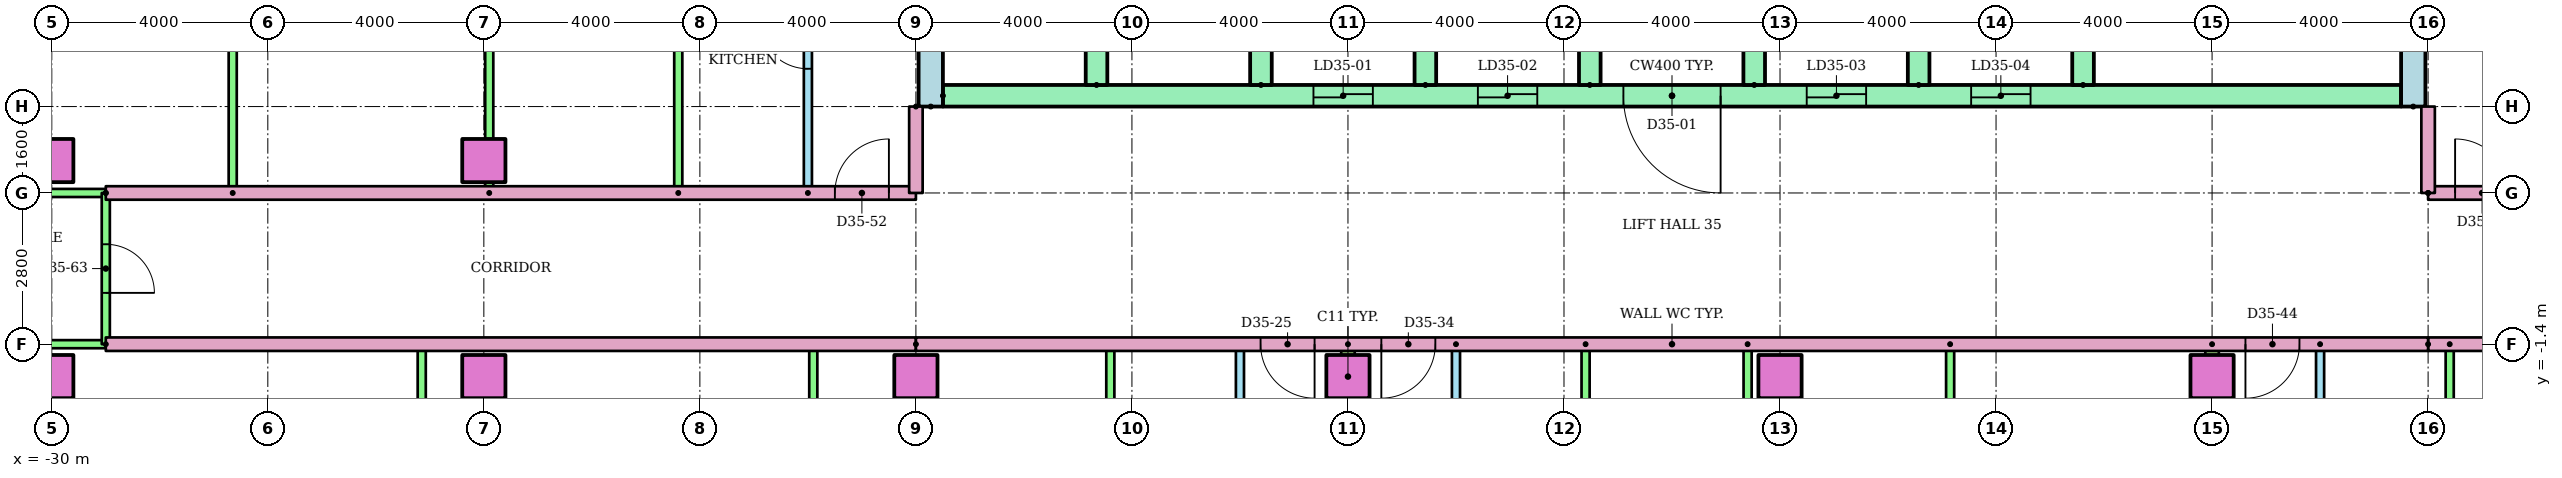
"""IFC4 building model, lengths in metres.
Left out: names, types, materials, properties, quantities, classifications, styles, units other than length and angle.
Written with IfcOpenShell. Run it as: python <this file> out.ifc"""

import sys

from ifc_helpers import new_model, si_unit, direction, frame, frame_2d, origin, origin_2d, place, context, subcontext, project, spatial, rectangle, extrude, element, fill, save


model = new_model("IFC4")
c1 = context("Model", 3, precision=1e-05, world=origin(), true_north=direction((0.0, 1.0)))
c2 = subcontext(c1, "Body", "Model", "MODEL_VIEW")
j1 = project(units=[si_unit("LENGTHUNIT", "METRE"), si_unit("PLANEANGLEUNIT", "RADIAN")], contexts=[c1])
p1 = place(None, origin())
s1 = spatial("IfcSite", under=j1, at=p1, CompositionType="ELEMENT")
p2 = place(p1, origin())
s2 = spatial("IfcBuilding", under=s1, at=p2, CompositionType="ELEMENT")
p3 = place(p2, frame((0.0, 0.0, 135.8)))
s3 = spatial("IfcBuildingStorey", under=s2, at=p3, CompositionType="ELEMENT", Elevation=135.8)
for number, where in (
    (1, (-30.0, -2.0, 0.0)),
    (2, (-22.0, -2.0, 0.0)),
    (3, (-14.0, -2.0, 0.0)),
    (4, (-6.0, -2.0, 0.0)),
    (5, (2.0, -2.0, 0.0)),
    (6, (10.0, -2.0, 0.0)),
    (7, (-30.0, 2.0, 0.0)),
    (8, (-22.0, 2.0, 0.0)),
):
    element("IfcColumn", number, at=place(p3, frame(where)), inside=s3, PredefinedType="COLUMN", context=c2, shape_type="SweptSolid", body=[
        extrude(rectangle(XDim=0.8, YDim=0.8, at=origin_2d()), origin(), (0.0, 0.0, 1.0), 3.2),
    ])
for number, where, z_axis, x_axis in (
    (9, (-13.725, 3.0, 0.0), (0.0, 0.0, 1.0), (0.0, 1.0, 0.0)),
    (10, (13.725, 3.0, 0.0), (0.0, 0.0, 1.0), (0.0, 1.0, 0.0)),
):
    element("IfcWall", number, at=place(p3, frame(where, z_axis=z_axis, x_axis=x_axis)), inside=s3, PredefinedType="SHEAR", context=c2, shape_type="SweptSolid", body=[
        extrude(rectangle(XDim=17.0, YDim=0.45, at=frame_2d((8.5, 0.0))), origin(), (0.0, 0.0, 1.0), 2.92),
    ])
p4 = place(p3, frame((-13.5, 3.2, 0.0)))
e11 = element("IfcWall", 11, at=p4, inside=s3, PredefinedType="SHEAR", context=c2, shape_type="SweptSolid", body=[
    extrude(rectangle(XDim=27.0, YDim=0.4, at=frame_2d((13.5, 0.0))), origin(), (0.0, 0.0, 1.0), 2.92),
])
p5 = place(p4, frame((6.861, 0.0, 0.0)))
e12 = element("IfcOpeningElement", 12, at=p5, cuts=e11, PredefinedType="OPENING", context=c2, shape_type="SweptSolid", body=[
    extrude(rectangle(XDim=1.1, YDim=2.1, at=frame_2d((0.55, 1.05))), frame((0.0, 0.21, 0.0), z_axis=(0.0, -1.0, 0.0), x_axis=(1.0, 0.0, 0.0)), (0.0, 0.0, 1.0), 0.42),
])
p6 = place(p4, frame((9.906, 0.0, 0.0)))
e13 = element("IfcOpeningElement", 13, at=p6, cuts=e11, PredefinedType="OPENING", context=c2, shape_type="SweptSolid", body=[
    extrude(rectangle(XDim=1.1, YDim=2.1, at=frame_2d((0.55, 1.05))), frame((0.0, 0.21, 0.0), z_axis=(0.0, -1.0, 0.0), x_axis=(1.0, 0.0, 0.0)), (0.0, 0.0, 1.0), 0.42),
])
p7 = place(p4, frame((15.994, 0.0, 0.0)))
e14 = element("IfcOpeningElement", 14, at=p7, cuts=e11, PredefinedType="OPENING", context=c2, shape_type="SweptSolid", body=[
    extrude(rectangle(XDim=1.1, YDim=2.1, at=frame_2d((0.55, 1.05))), frame((0.0, 0.21, 0.0), z_axis=(0.0, -1.0, 0.0), x_axis=(1.0, 0.0, 0.0)), (0.0, 0.0, 1.0), 0.42),
])
p8 = place(p4, frame((19.039, 0.0, 0.0)))
e15 = element("IfcOpeningElement", 15, at=p8, cuts=e11, PredefinedType="OPENING", context=c2, shape_type="SweptSolid", body=[
    extrude(rectangle(XDim=1.1, YDim=2.1, at=frame_2d((0.55, 1.05))), frame((0.0, 0.21, 0.0), z_axis=(0.0, -1.0, 0.0), x_axis=(1.0, 0.0, 0.0)), (0.0, 0.0, 1.0), 0.42),
])
p9 = place(p4, frame((12.6, 0.0, 0.0)))
e16 = element("IfcOpeningElement", 16, at=p9, cuts=e11, PredefinedType="OPENING", context=c2, shape_type="SweptSolid", body=[
    extrude(rectangle(XDim=1.8, YDim=2.1, at=frame_2d((0.9, 1.05))), frame((0.0, 0.21, 0.0), z_axis=(0.0, -1.0, 0.0), x_axis=(1.0, 0.0, 0.0)), (0.0, 0.0, 1.0), 0.42),
])
for number, where, z_axis, x_axis in (
    (17, (-10.656, 3.4, 0.0), (0.0, 0.0, 1.0), (0.0, 1.0, 0.0)),
    (18, (-7.611, 3.4, 0.0), (0.0, 0.0, 1.0), (0.0, 1.0, 0.0)),
    (19, (-4.567, 3.4, 0.0), (0.0, 0.0, 1.0), (0.0, 1.0, 0.0)),
    (20, (-1.522, 3.4, 0.0), (0.0, 0.0, 1.0), (0.0, 1.0, 0.0)),
    (21, (1.522, 3.4, 0.0), (0.0, 0.0, 1.0), (0.0, 1.0, 0.0)),
    (22, (4.567, 3.4, 0.0), (0.0, 0.0, 1.0), (0.0, 1.0, 0.0)),
    (23, (7.611, 3.4, 0.0), (0.0, 0.0, 1.0), (0.0, 1.0, 0.0)),
):
    element("IfcWall", number, at=place(p3, frame(where, z_axis=z_axis, x_axis=x_axis)), inside=s3, PredefinedType="SHEAR", context=c2, shape_type="SweptSolid", body=[
        extrude(rectangle(XDim=3.0, YDim=0.4, at=frame_2d((1.5, 0.0))), origin(), (0.0, 0.0, 1.0), 2.92),
    ])
p10 = place(p3, frame((-8.0, -9.2, 0.0), z_axis=(0.0, 0.0, 1.0), x_axis=(0.0, 1.0, 0.0)))
e24 = element("IfcWall", 24, at=p10, inside=s3, PredefinedType="PARTITIONING", context=c2, shape_type="SweptSolid", body=[
    extrude(rectangle(XDim=7.8, YDim=0.15, at=frame_2d((3.9, 0.0))), origin(), (0.0, 0.0, 1.0), 2.4),
])
p11 = place(p10, frame((5.225, 0.0, 0.0)))
e25 = element("IfcOpeningElement", 25, at=p11, cuts=e24, PredefinedType="OPENING", context=c2, shape_type="SweptSolid", body=[
    extrude(rectangle(XDim=0.9, YDim=2.1, at=frame_2d((0.45, 1.05))), frame((0.0, 0.085, 0.0), z_axis=(0.0, -1.0, 0.0), x_axis=(1.0, 0.0, 0.0)), (0.0, 0.0, 1.0), 0.17),
])
p12 = place(p10, frame((1.375, 0.0, 0.0)))
e26 = element("IfcOpeningElement", 26, at=p12, cuts=e24, PredefinedType="OPENING", context=c2, shape_type="SweptSolid", body=[
    extrude(rectangle(XDim=0.8, YDim=2.1, at=frame_2d((0.4, 1.05))), frame((0.0, 0.085, 0.0), z_axis=(0.0, -1.0, 0.0), x_axis=(1.0, 0.0, 0.0)), (0.0, 0.0, 1.0), 0.17),
])
for number, where, z_axis, x_axis in (
    (27, (-10.4, -9.2, 0.0), (0.0, 0.0, 1.0), (0.0, 1.0, 0.0)),
    (28, (-15.9, -9.2, 0.0), (0.0, 0.0, 1.0), (0.0, 1.0, 0.0)),
    (29, (-23.15, -9.2, 0.0), (0.0, 0.0, 1.0), (0.0, 1.0, 0.0)),
):
    element("IfcWall", number, at=place(p3, frame(where, z_axis=z_axis, x_axis=x_axis)), inside=s3, PredefinedType="PARTITIONING", context=c2, shape_type="SweptSolid", body=[
        extrude(rectangle(XDim=7.8, YDim=0.15, at=frame_2d((3.9, 0.0))), origin(), (0.0, 0.0, 1.0), 2.4),
    ])
p13 = place(p3, frame((-4.0, -1.4, 0.0), z_axis=(0.0, 0.0, 1.0), x_axis=(0.0, -1.0, 0.0)))
e30 = element("IfcWall", 30, at=p13, inside=s3, PredefinedType="PARTITIONING", context=c2, shape_type="SweptSolid", body=[
    extrude(rectangle(XDim=7.8, YDim=0.15, at=frame_2d((3.9, 0.0))), origin(), (0.0, 0.0, 1.0), 2.4),
])
p14 = place(p13, frame((1.675, 0.0, 0.0)))
e31 = element("IfcOpeningElement", 31, at=p14, cuts=e30, PredefinedType="OPENING", context=c2, shape_type="SweptSolid", body=[
    extrude(rectangle(XDim=0.9, YDim=2.1, at=frame_2d((0.45, 1.05))), frame((0.0, 0.085, 0.0), z_axis=(0.0, -1.0, 0.0), x_axis=(1.0, 0.0, 0.0)), (0.0, 0.0, 1.0), 0.17),
])
p15 = place(p13, frame((5.625, 0.0, 0.0)))
e32 = element("IfcOpeningElement", 32, at=p15, cuts=e30, PredefinedType="OPENING", context=c2, shape_type="SweptSolid", body=[
    extrude(rectangle(XDim=0.8, YDim=2.1, at=frame_2d((0.4, 1.05))), frame((0.0, 0.085, 0.0), z_axis=(0.0, -1.0, 0.0), x_axis=(1.0, 0.0, 0.0)), (0.0, 0.0, 1.0), 0.17),
])
for number, where, z_axis, x_axis in (
    (33, (-1.6, -1.4, 0.0), (0.0, 0.0, 1.0), (0.0, -1.0, 0.0)),
    (34, (1.4, -1.4, 0.0), (0.0, 0.0, 1.0), (0.0, -1.0, 0.0)),
    (35, (5.15, -1.4, 0.0), (0.0, 0.0, 1.0), (0.0, -1.0, 0.0)),
):
    element("IfcWall", number, at=place(p3, frame(where, z_axis=z_axis, x_axis=x_axis)), inside=s3, PredefinedType="PARTITIONING", context=c2, shape_type="SweptSolid", body=[
        extrude(rectangle(XDim=7.8, YDim=0.15, at=frame_2d((3.9, 0.0))), origin(), (0.0, 0.0, 1.0), 2.4),
    ])
p16 = place(p3, frame((-6.0, -1.4, 0.0), z_axis=(0.0, 0.0, 1.0), x_axis=(0.0, -1.0, 0.0)))
e36 = element("IfcWall", 36, at=p16, inside=s3, PredefinedType="PARTITIONING", context=c2, shape_type="SweptSolid", body=[
    extrude(rectangle(XDim=14.91, YDim=0.25, at=frame_2d((7.455, 0.0))), origin(), (0.0, 0.0, 1.0), 2.4),
])
p17 = place(p3, frame((12.0, -1.4, 0.0), z_axis=(0.0, 0.0, 1.0), x_axis=(0.0, -1.0, 0.0)))
e37 = element("IfcWall", 37, at=p17, inside=s3, PredefinedType="PARTITIONING", context=c2, shape_type="SweptSolid", body=[
    extrude(rectangle(XDim=7.8, YDim=0.15, at=frame_2d((3.9, 0.0))), origin(), (0.0, 0.0, 1.0), 2.4),
])
p18 = place(p17, frame((1.675, 0.0, 0.0)))
e38 = element("IfcOpeningElement", 38, at=p18, cuts=e37, PredefinedType="OPENING", context=c2, shape_type="SweptSolid", body=[
    extrude(rectangle(XDim=0.9, YDim=2.1, at=frame_2d((0.45, 1.05))), frame((0.0, 0.085, 0.0), z_axis=(0.0, -1.0, 0.0), x_axis=(1.0, 0.0, 0.0)), (0.0, 0.0, 1.0), 0.17),
])
p19 = place(p17, frame((5.625, 0.0, 0.0)))
e39 = element("IfcOpeningElement", 39, at=p19, cuts=e37, PredefinedType="OPENING", context=c2, shape_type="SweptSolid", body=[
    extrude(rectangle(XDim=0.8, YDim=2.1, at=frame_2d((0.4, 1.05))), frame((0.0, 0.085, 0.0), z_axis=(0.0, -1.0, 0.0), x_axis=(1.0, 0.0, 0.0)), (0.0, 0.0, 1.0), 0.17),
])
p20 = place(p3, frame((14.4, -1.4, 0.0), z_axis=(0.0, 0.0, 1.0), x_axis=(0.0, -1.0, 0.0)))
e40 = element("IfcWall", 40, at=p20, inside=s3, PredefinedType="PARTITIONING", context=c2, shape_type="SweptSolid", body=[
    extrude(rectangle(XDim=7.8, YDim=0.15, at=frame_2d((3.9, 0.0))), origin(), (0.0, 0.0, 1.0), 2.4),
])
p21 = place(p3, frame((10.0, -1.4, 0.0), z_axis=(0.0, 0.0, 1.0), x_axis=(0.0, -1.0, 0.0)))
e41 = element("IfcWall", 41, at=p21, inside=s3, PredefinedType="PARTITIONING", context=c2, shape_type="SweptSolid", body=[
    extrude(rectangle(XDim=14.91, YDim=0.25, at=frame_2d((7.455, 0.0))), origin(), (0.0, 0.0, 1.0), 2.4),
])
p22 = place(p3, frame((-14.0, -1.4, 0.0), z_axis=(0.0, 0.0, 1.0), x_axis=(-1.0, 0.0, 0.0)))
e42 = element("IfcWall", 42, at=p22, inside=s3, PredefinedType="PARTITIONING", context=c2, shape_type="SweptSolid", body=[
    extrude(rectangle(XDim=15.0, YDim=0.25, at=frame_2d((7.5, 0.0))), origin(), (0.0, 0.0, 1.0), 2.4),
])
p23 = place(p3, frame((-29.0, -1.4, 0.0), z_axis=(0.0, 0.0, 1.0), x_axis=(-1.0, 0.0, 0.0)))
e43 = element("IfcWall", 43, at=p23, inside=s3, PredefinedType="PARTITIONING", context=c2, shape_type="SweptSolid", body=[
    extrude(rectangle(XDim=3.72, YDim=0.15, at=frame_2d((1.86, 0.0))), origin(), (0.0, 0.0, 1.0), 2.4),
])
p24 = place(p3, frame((29.0, -1.4, 0.0), z_axis=(0.0, 0.0, 1.0), x_axis=(-1.0, 0.0, 0.0)))
e44 = element("IfcWall", 44, at=p24, inside=s3, PredefinedType="PARTITIONING", context=c2, shape_type="SweptSolid", body=[
    extrude(rectangle(XDim=15.0, YDim=0.25, at=frame_2d((7.5, 0.0))), origin(), (0.0, 0.0, 1.0), 2.4),
])
p25 = place(p3, frame((-16.0, 1.4, 0.0), z_axis=(0.0, 0.0, 1.0), x_axis=(0.0, 1.0, 0.0)))
e45 = element("IfcWall", 45, at=p25, inside=s3, PredefinedType="PARTITIONING", context=c2, shape_type="SweptSolid", body=[
    extrude(rectangle(XDim=10.2, YDim=0.15, at=frame_2d((5.1, 0.0))), origin(), (0.0, 0.0, 1.0), 2.4),
])
p26 = place(p25, frame((2.3, 0.0, 0.0)))
e46 = element("IfcOpeningElement", 46, at=p26, cuts=e45, PredefinedType="OPENING", context=c2, shape_type="SweptSolid", body=[
    extrude(rectangle(XDim=0.9, YDim=2.1, at=frame_2d((0.45, 1.05))), frame((0.0, 0.085, 0.0), z_axis=(0.0, -1.0, 0.0), x_axis=(1.0, 0.0, 0.0)), (0.0, 0.0, 1.0), 0.17),
])
p27 = place(p25, frame((7.45, 0.0, 0.0)))
e47 = element("IfcOpeningElement", 47, at=p27, cuts=e45, PredefinedType="OPENING", context=c2, shape_type="SweptSolid", body=[
    extrude(rectangle(XDim=0.8, YDim=2.1, at=frame_2d((0.4, 1.05))), frame((0.0, 0.085, 0.0), z_axis=(0.0, -1.0, 0.0), x_axis=(1.0, 0.0, 0.0)), (0.0, 0.0, 1.0), 0.17),
])
for number, where, z_axis, x_axis in (
    (48, (-18.4, 1.4, 0.0), (0.0, 0.0, 1.0), (0.0, 1.0, 0.0)),
    (49, (-21.9, 1.4, 0.0), (0.0, 0.0, 1.0), (0.0, 1.0, 0.0)),
    (50, (-26.65, 1.4, 0.0), (0.0, 0.0, 1.0), (0.0, 1.0, 0.0)),
):
    element("IfcWall", number, at=place(p3, frame(where, z_axis=z_axis, x_axis=x_axis)), inside=s3, PredefinedType="PARTITIONING", context=c2, shape_type="SweptSolid", body=[
        extrude(rectangle(XDim=10.2, YDim=0.15, at=frame_2d((5.1, 0.0))), origin(), (0.0, 0.0, 1.0), 2.4),
    ])
p28 = place(p3, frame((-29.0, 1.4, 0.0)))
e51 = element("IfcWall", 51, at=p28, inside=s3, PredefinedType="PARTITIONING", context=c2, shape_type="SweptSolid", body=[
    extrude(rectangle(XDim=15.0, YDim=0.25, at=frame_2d((7.5, 0.0))), origin(), (0.0, 0.0, 1.0), 2.4),
])
p29 = place(p28, frame((13.5, 0.0, 0.0)))
e52 = element("IfcOpeningElement", 52, at=p29, cuts=e51, PredefinedType="OPENING", context=c2, shape_type="SweptSolid", body=[
    extrude(rectangle(XDim=1.0, YDim=2.1, at=frame_2d((0.5, 1.05))), frame((0.0, 0.135, 0.0), z_axis=(0.0, -1.0, 0.0), x_axis=(1.0, 0.0, 0.0)), (0.0, 0.0, 1.0), 0.27),
])
p30 = place(p3, frame((-32.72, 1.4, 0.0)))
e53 = element("IfcWall", 53, at=p30, inside=s3, PredefinedType="PARTITIONING", context=c2, shape_type="SweptSolid", body=[
    extrude(rectangle(XDim=3.72, YDim=0.15, at=frame_2d((1.86, 0.0))), origin(), (0.0, 0.0, 1.0), 2.4),
])
p31 = place(p3, frame((14.0, 1.4, 0.0)))
e54 = element("IfcWall", 54, at=p31, inside=s3, PredefinedType="PARTITIONING", context=c2, shape_type="SweptSolid", body=[
    extrude(rectangle(XDim=15.0, YDim=0.25, at=frame_2d((7.5, 0.0))), origin(), (0.0, 0.0, 1.0), 2.4),
])
p32 = place(p31, frame((0.5, 0.0, 0.0)))
e55 = element("IfcOpeningElement", 55, at=p32, cuts=e54, PredefinedType="OPENING", context=c2, shape_type="SweptSolid", body=[
    extrude(rectangle(XDim=1.0, YDim=2.1, at=frame_2d((0.5, 1.05))), frame((0.0, 0.135, 0.0), z_axis=(0.0, -1.0, 0.0), x_axis=(1.0, 0.0, 0.0)), (0.0, 0.0, 1.0), 0.27),
])
p33 = place(p3, frame((-29.0, 1.4, 0.0), z_axis=(0.0, 0.0, 1.0), x_axis=(0.0, -1.0, 0.0)))
e56 = element("IfcWall", 56, at=p33, inside=s3, PredefinedType="PARTITIONING", context=c2, shape_type="SweptSolid", body=[
    extrude(rectangle(XDim=2.8, YDim=0.15, at=frame_2d((1.4, 0.0))), origin(), (0.0, 0.0, 1.0), 2.4),
])
p34 = place(p33, frame((0.95, 0.0, 0.0)))
e57 = element("IfcOpeningElement", 57, at=p34, cuts=e56, PredefinedType="OPENING", context=c2, shape_type="SweptSolid", body=[
    extrude(rectangle(XDim=0.9, YDim=2.1, at=frame_2d((0.45, 1.05))), frame((0.0, 0.085, 0.0), z_axis=(0.0, -1.0, 0.0), x_axis=(1.0, 0.0, 0.0)), (0.0, 0.0, 1.0), 0.17),
])
p35 = place(p3, frame((14.0, -1.4, 0.0), z_axis=(0.0, 0.0, 1.0), x_axis=(-1.0, 0.0, 0.0)))
e58 = element("IfcWall", 58, at=p35, inside=s3, PredefinedType="PARTITIONING", context=c2, shape_type="SweptSolid", body=[
    extrude(rectangle(XDim=28.0, YDim=0.25, at=frame_2d((14.0, 0.0))), origin(), (0.0, 0.0, 1.0), 2.4),
])
p36 = place(p35, frame((20.618, 0.0, 0.0)))
e59 = element("IfcOpeningElement", 59, at=p36, cuts=e58, PredefinedType="OPENING", context=c2, shape_type="SweptSolid", body=[
    extrude(rectangle(XDim=1.0, YDim=2.1, at=frame_2d((0.5, 1.05))), frame((0.0, 0.135, 0.0), z_axis=(0.0, -1.0, 0.0), x_axis=(1.0, 0.0, 0.0)), (0.0, 0.0, 1.0), 0.27),
])
p37 = place(p35, frame((18.382, 0.0, 0.0)))
e60 = element("IfcOpeningElement", 60, at=p37, cuts=e58, PredefinedType="OPENING", context=c2, shape_type="SweptSolid", body=[
    extrude(rectangle(XDim=1.0, YDim=2.1, at=frame_2d((0.5, 1.05))), frame((0.0, 0.135, 0.0), z_axis=(0.0, -1.0, 0.0), x_axis=(1.0, 0.0, 0.0)), (0.0, 0.0, 1.0), 0.27),
])
p38 = place(p35, frame((2.382, 0.0, 0.0)))
e61 = element("IfcOpeningElement", 61, at=p38, cuts=e58, PredefinedType="OPENING", context=c2, shape_type="SweptSolid", body=[
    extrude(rectangle(XDim=1.0, YDim=2.1, at=frame_2d((0.5, 1.05))), frame((0.0, 0.135, 0.0), z_axis=(0.0, -1.0, 0.0), x_axis=(1.0, 0.0, 0.0)), (0.0, 0.0, 1.0), 0.27),
])
for number, where, z_axis, x_axis in (
    (62, (-14.0, 3.0, 0.0), (0.0, 0.0, 1.0), (0.0, -1.0, 0.0)),
    (63, (14.0, 1.4, 0.0), (0.0, 0.0, 1.0), (0.0, 1.0, 0.0)),
):
    element("IfcWall", number, at=place(p3, frame(where, z_axis=z_axis, x_axis=x_axis)), inside=s3, PredefinedType="PARTITIONING", context=c2, shape_type="SweptSolid", body=[
        extrude(rectangle(XDim=1.6, YDim=0.25, at=frame_2d((0.8, 0.0))), origin(), (0.0, 0.0, 1.0), 2.4),
    ])
p39 = place(p5, origin())
e64 = element("IfcDoor", 64, at=p39, inside=s3, OperationType="SLIDING_TO_LEFT", PredefinedType="DOOR", context=c2, shape_type="SweptSolid", body=[
    extrude(rectangle(XDim=1.1, YDim=2.1, at=frame_2d((0.55, 1.05))), frame((0.0, 0.025, 0.0), z_axis=(0.0, -1.0, 0.0), x_axis=(1.0, 0.0, 0.0)), (0.0, 0.0, 1.0), 0.05),
])
fill(e12, e64)
p40 = place(p6, origin())
e65 = element("IfcDoor", 65, at=p40, inside=s3, OperationType="SLIDING_TO_LEFT", PredefinedType="DOOR", context=c2, shape_type="SweptSolid", body=[
    extrude(rectangle(XDim=1.1, YDim=2.1, at=frame_2d((0.55, 1.05))), frame((0.0, 0.025, 0.0), z_axis=(0.0, -1.0, 0.0), x_axis=(1.0, 0.0, 0.0)), (0.0, 0.0, 1.0), 0.05),
])
fill(e13, e65)
p41 = place(p7, origin())
e66 = element("IfcDoor", 66, at=p41, inside=s3, OperationType="SLIDING_TO_LEFT", PredefinedType="DOOR", context=c2, shape_type="SweptSolid", body=[
    extrude(rectangle(XDim=1.1, YDim=2.1, at=frame_2d((0.55, 1.05))), frame((0.0, 0.025, 0.0), z_axis=(0.0, -1.0, 0.0), x_axis=(1.0, 0.0, 0.0)), (0.0, 0.0, 1.0), 0.05),
])
fill(e14, e66)
p42 = place(p8, origin())
e67 = element("IfcDoor", 67, at=p42, inside=s3, OperationType="SLIDING_TO_LEFT", PredefinedType="DOOR", context=c2, shape_type="SweptSolid", body=[
    extrude(rectangle(XDim=1.1, YDim=2.1, at=frame_2d((0.55, 1.05))), frame((0.0, 0.025, 0.0), z_axis=(0.0, -1.0, 0.0), x_axis=(1.0, 0.0, 0.0)), (0.0, 0.0, 1.0), 0.05),
])
fill(e15, e67)
p43 = place(p9, frame((1.8, 0.0, 0.0), z_axis=(0.0, 0.0, 1.0), x_axis=(-1.0, 0.0, 0.0)))
e68 = element("IfcDoor", 68, at=p43, inside=s3, OperationType="DOUBLE_DOOR_SINGLE_SWING", PredefinedType="DOOR", context=c2, shape_type="SweptSolid", body=[
    extrude(rectangle(XDim=1.8, YDim=2.1, at=frame_2d((0.9, 1.05))), frame((0.0, 0.025, 0.0), z_axis=(0.0, -1.0, 0.0), x_axis=(1.0, 0.0, 0.0)), (0.0, 0.0, 1.0), 0.05),
])
fill(e16, e68)
p44 = place(p36, origin())
e69 = element("IfcDoor", 69, at=p44, inside=s3, OperationType="SINGLE_SWING_LEFT", PredefinedType="DOOR", context=c2, shape_type="SweptSolid", body=[
    extrude(rectangle(XDim=1.0, YDim=2.1, at=frame_2d((0.5, 1.05))), frame((0.0, 0.025, 0.0), z_axis=(0.0, -1.0, 0.0), x_axis=(1.0, 0.0, 0.0)), (0.0, 0.0, 1.0), 0.05),
])
fill(e59, e69)
p45 = place(p37, origin())
e70 = element("IfcDoor", 70, at=p45, inside=s3, OperationType="SINGLE_SWING_RIGHT", PredefinedType="DOOR", context=c2, shape_type="SweptSolid", body=[
    extrude(rectangle(XDim=1.0, YDim=2.1, at=frame_2d((0.5, 1.05))), frame((0.0, 0.025, 0.0), z_axis=(0.0, -1.0, 0.0), x_axis=(1.0, 0.0, 0.0)), (0.0, 0.0, 1.0), 0.05),
])
fill(e60, e70)
p46 = place(p38, origin())
e71 = element("IfcDoor", 71, at=p46, inside=s3, OperationType="SINGLE_SWING_RIGHT", PredefinedType="DOOR", context=c2, shape_type="SweptSolid", body=[
    extrude(rectangle(XDim=1.0, YDim=2.1, at=frame_2d((0.5, 1.05))), frame((0.0, 0.025, 0.0), z_axis=(0.0, -1.0, 0.0), x_axis=(1.0, 0.0, 0.0)), (0.0, 0.0, 1.0), 0.05),
])
fill(e61, e71)
p47 = place(p26, origin())
e72 = element("IfcDoor", 72, at=p47, inside=s3, OperationType="SINGLE_SWING_RIGHT", PredefinedType="DOOR", context=c2, shape_type="SweptSolid", body=[
    extrude(rectangle(XDim=0.9, YDim=2.1, at=frame_2d((0.45, 1.05))), frame((0.0, 0.025, 0.0), z_axis=(0.0, -1.0, 0.0), x_axis=(1.0, 0.0, 0.0)), (0.0, 0.0, 1.0), 0.05),
])
fill(e46, e72)
p48 = place(p29, origin())
e73 = element("IfcDoor", 73, at=p48, inside=s3, OperationType="SINGLE_SWING_RIGHT", PredefinedType="DOOR", context=c2, shape_type="SweptSolid", body=[
    extrude(rectangle(XDim=1.0, YDim=2.1, at=frame_2d((0.5, 1.05))), frame((0.0, 0.025, 0.0), z_axis=(0.0, -1.0, 0.0), x_axis=(1.0, 0.0, 0.0)), (0.0, 0.0, 1.0), 0.05),
])
fill(e52, e73)
p49 = place(p32, origin())
e74 = element("IfcDoor", 74, at=p49, inside=s3, OperationType="SINGLE_SWING_LEFT", PredefinedType="DOOR", context=c2, shape_type="SweptSolid", body=[
    extrude(rectangle(XDim=1.0, YDim=2.1, at=frame_2d((0.5, 1.05))), frame((0.0, 0.025, 0.0), z_axis=(0.0, -1.0, 0.0), x_axis=(1.0, 0.0, 0.0)), (0.0, 0.0, 1.0), 0.05),
])
fill(e55, e74)
p50 = place(p34, origin())
e75 = element("IfcDoor", 75, at=p50, inside=s3, OperationType="SINGLE_SWING_RIGHT", PredefinedType="DOOR", context=c2, shape_type="SweptSolid", body=[
    extrude(rectangle(XDim=0.9, YDim=2.1, at=frame_2d((0.45, 1.05))), frame((0.0, 0.025, 0.0), z_axis=(0.0, -1.0, 0.0), x_axis=(1.0, 0.0, 0.0)), (0.0, 0.0, 1.0), 0.05),
])
fill(e57, e75)
save(model, sys.argv[1])
